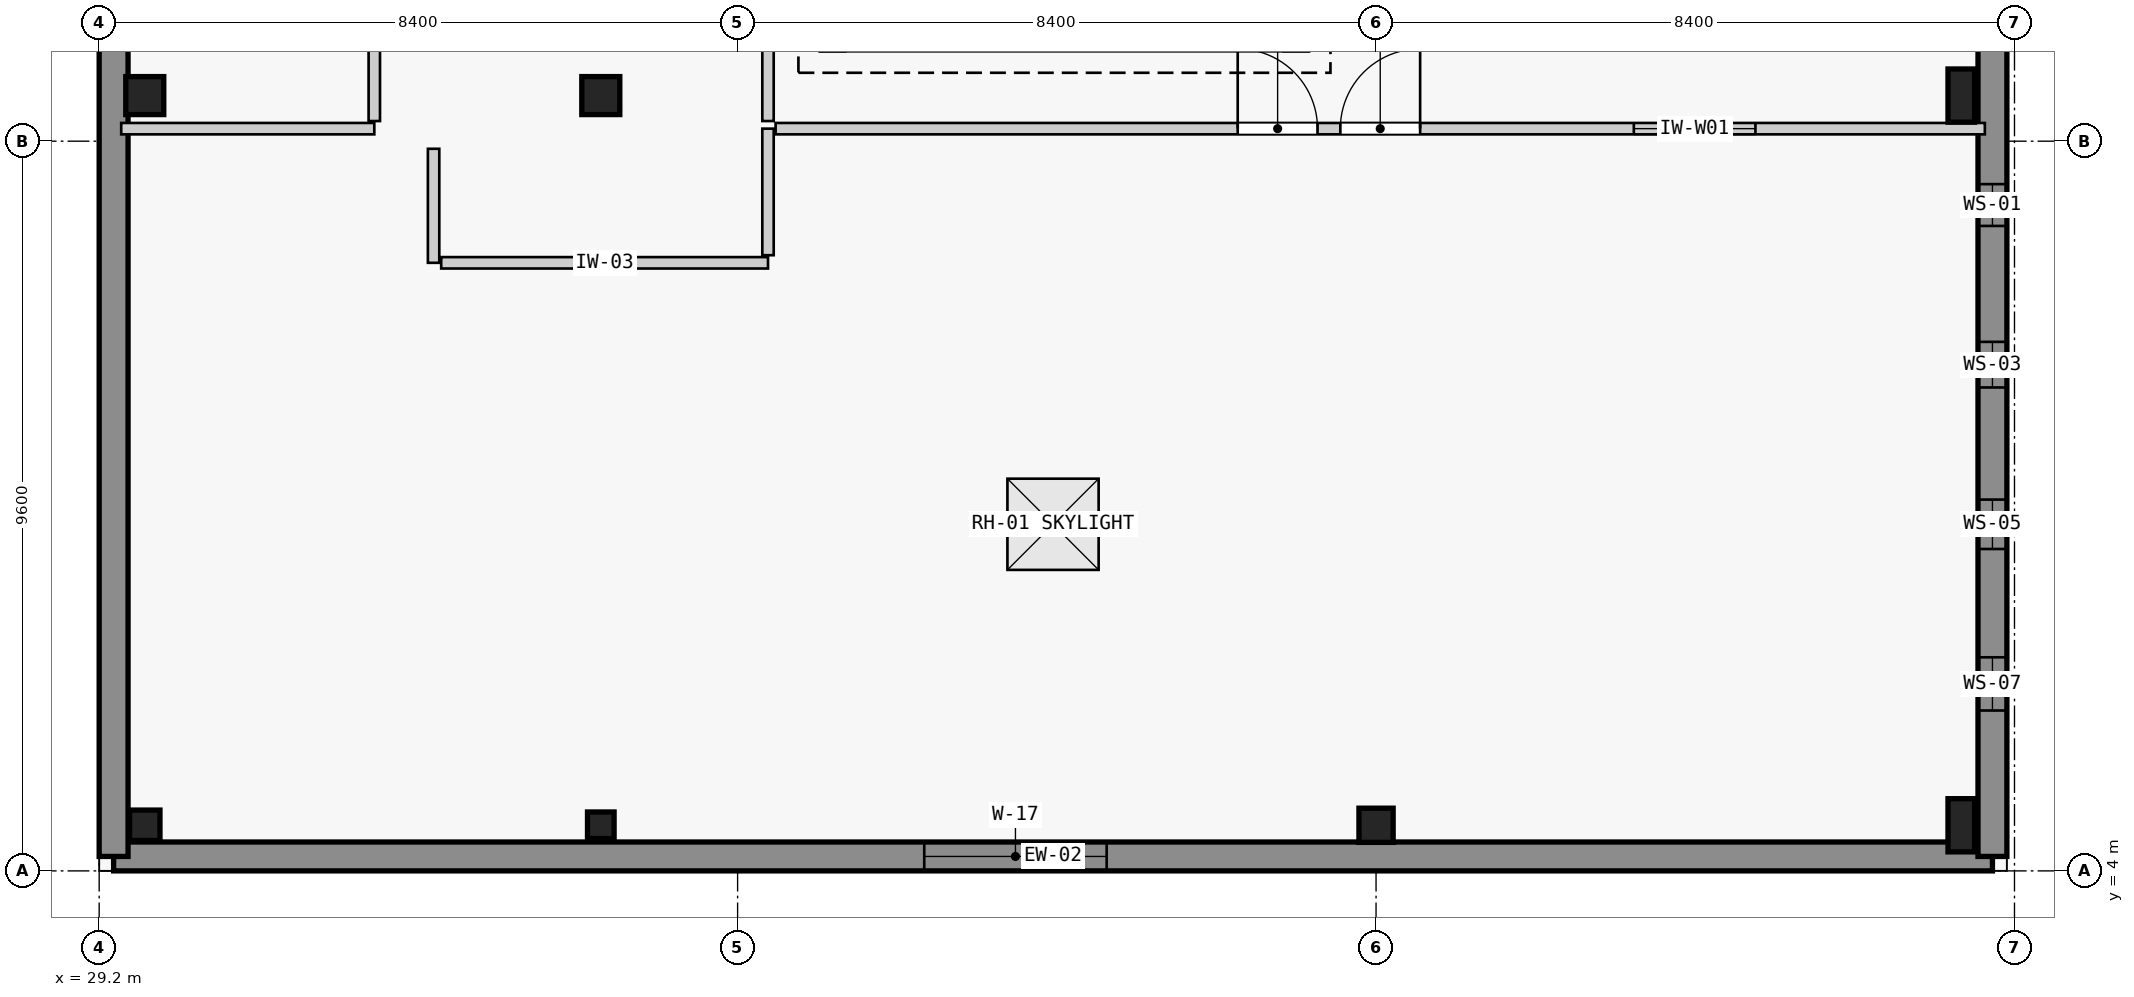
"""IFC4 building model, lengths in metres.
Left out: names, types, materials, properties, quantities, classifications, styles, units other than length and angle.
Written with IfcOpenShell. Run it as: python <this file> out.ifc"""

import sys

from ifc_helpers import new_model, si_unit, direction, frame, frame_2d, origin, origin_2d, place, context, subcontext, project, spatial, rectangle, extrude, element, fill, save


model = new_model("IFC4")
c1 = context("Model", 3, precision=1e-05, world=origin(), true_north=direction((0.0, 1.0)))
c2 = subcontext(c1, "Body", "Model", "MODEL_VIEW")
j1 = project(units=[si_unit("LENGTHUNIT", "METRE"), si_unit("PLANEANGLEUNIT", "RADIAN")], contexts=[c1])
p1 = place(None, origin())
s1 = spatial("IfcSite", under=j1, at=p1, CompositionType="ELEMENT")
p2 = place(p1, origin())
s2 = spatial("IfcBuilding", under=s1, at=p2, CompositionType="ELEMENT")
p3 = place(p2, frame((0.0, 0.0, 5.4)))
s3 = spatial("IfcBuildingStorey", under=s2, at=p3, CompositionType="ELEMENT", Elevation=5.4)
p4 = place(p3, frame((29.8, 4.6, 0.0), z_axis=(0.0, 0.0, 1.0), x_axis=(1.0, 0.0, 0.0)))
e1 = element("IfcColumn", 1, at=p4, inside=s3, PredefinedType="COLUMN", context=c2, shape_type="SweptSolid", body=[
    extrude(rectangle(XDim=0.4, YDim=0.4, at=origin_2d()), origin(), (0.0, 0.0, 1.0), 4.2),
])
p5 = place(p3, frame((29.8, 14.2, 0.0), z_axis=(0.0, 0.0, 1.0), x_axis=(1.0, 0.0, 0.0)))
e2 = element("IfcColumn", 2, at=p5, inside=s3, PredefinedType="COLUMN", context=c2, shape_type="SweptSolid", body=[
    extrude(rectangle(XDim=0.5, YDim=0.5, at=origin_2d()), origin(), (0.0, 0.0, 1.0), 4.2),
])
p6 = place(p3, frame((35.8, 4.6, 0.0), z_axis=(0.0, 0.0, 1.0), x_axis=(1.0, 0.0, 0.0)))
e3 = element("IfcColumn", 3, at=p6, inside=s3, PredefinedType="COLUMN", context=c2, shape_type="SweptSolid", body=[
    extrude(rectangle(XDim=0.35, YDim=0.35, at=origin_2d()), origin(), (0.0, 0.0, 1.0), 4.2),
])
p7 = place(p3, frame((35.8, 14.2, 0.0), z_axis=(0.0, 0.0, 1.0), x_axis=(1.0, 0.0, 0.0)))
e4 = element("IfcColumn", 4, at=p7, inside=s3, PredefinedType="COLUMN", context=c2, shape_type="SweptSolid", body=[
    extrude(rectangle(XDim=0.5, YDim=0.5, at=origin_2d()), origin(), (0.0, 0.0, 1.0), 4.2),
])
p8 = place(p3, frame((46.0, 4.6, 0.0), z_axis=(0.0, 0.0, 1.0), x_axis=(1.0, 0.0, 0.0)))
e5 = element("IfcColumn", 5, at=p8, inside=s3, PredefinedType="COLUMN", context=c2, shape_type="SweptSolid", body=[
    extrude(rectangle(XDim=0.45, YDim=0.45, at=origin_2d()), origin(), (0.0, 0.0, 1.0), 4.2),
])
for number, where, z_axis, x_axis in (
    (6, (53.7, 4.6, 0.0), (0.0, 0.0, 1.0), (1.0, 0.0, 0.0)),
    (7, (53.7, 14.2, 0.0), (0.0, 0.0, 1.0), (1.0, 0.0, 0.0)),
):
    element("IfcColumn", number, at=place(p3, frame(where, z_axis=z_axis, x_axis=x_axis)), inside=s3, PredefinedType="COLUMN", context=c2, shape_type="SweptSolid", body=[
        extrude(rectangle(XDim=0.35, YDim=0.7, at=origin_2d()), origin(), (0.0, 0.0, 1.0), 4.2),
    ])
p9 = place(p3, frame((54.11, 4.19, 0.0), z_axis=(0.0, 0.0, 1.0), x_axis=(-1.0, 0.0, 0.0)))
e8 = element("IfcWall", 8, at=p9, inside=s3, PredefinedType="STANDARD", context=c2, shape_type="SweptSolid", body=[
    extrude(rectangle(XDim=24.72, YDim=0.38, at=frame_2d((12.36, 0.0))), origin(), (0.0, 0.0, 1.0), 3.94),
])
p10 = place(p9, frame((11.654, 0.0, 1.65)))
e9 = element("IfcOpeningElement", 9, at=p10, cuts=e8, PredefinedType="OPENING", context=c2, shape_type="SweptSolid", body=[
    extrude(rectangle(XDim=2.4, YDim=1.8, at=frame_2d((1.2, 0.9))), frame((0.0, 0.2, 0.0), z_axis=(0.0, -1.0, 0.0), x_axis=(1.0, 0.0, 0.0)), (0.0, 0.0, 1.0), 0.4),
])
p11 = place(p3, frame((29.39, 4.19, 0.0), z_axis=(0.0, 0.0, 1.0), x_axis=(0.0, 1.0, 0.0)))
e10 = element("IfcWall", 10, at=p11, inside=s3, PredefinedType="STANDARD", context=c2, shape_type="SweptSolid", body=[
    extrude(rectangle(XDim=37.92, YDim=0.38, at=frame_2d((18.96, 0.0))), origin(), (0.0, 0.0, 1.0), 3.94),
])
p12 = place(p11, frame((16.568, 0.0, 0.96)))
e11 = element("IfcOpeningElement", 11, at=p12, cuts=e10, PredefinedType="OPENING", context=c2, shape_type="SweptSolid", body=[
    extrude(rectangle(XDim=1.5, YDim=2.6, at=frame_2d((0.75, 1.3))), frame((0.0, 0.2, 0.0), z_axis=(0.0, -1.0, 0.0), x_axis=(1.0, 0.0, 0.0)), (0.0, 0.0, 1.0), 0.4),
])
p13 = place(p3, frame((54.11, 42.11, 0.0), z_axis=(0.0, 0.0, 1.0), x_axis=(0.0, -1.0, 0.0)))
e12 = element("IfcWall", 12, at=p13, inside=s3, PredefinedType="STANDARD", context=c2, shape_type="SweptSolid", body=[
    extrude(rectangle(XDim=37.92, YDim=0.38, at=frame_2d((18.96, 0.0))), origin(), (0.0, 0.0, 1.0), 3.94),
])
p14 = place(p13, frame((1.45, 0.0, 0.95)))
e13 = element("IfcOpeningElement", 13, at=p14, cuts=e12, PredefinedType="OPENING", context=c2, shape_type="SweptSolid", body=[
    extrude(rectangle(XDim=1.2, YDim=2.4, at=frame_2d((0.6, 1.2))), frame((0.0, 0.2, 0.0), z_axis=(0.0, -1.0, 0.0), x_axis=(1.0, 0.0, 0.0)), (0.0, 0.0, 1.0), 0.4),
])
p15 = place(p13, frame((3.475, 0.0, 0.95)))
e14 = element("IfcOpeningElement", 14, at=p15, cuts=e12, PredefinedType="OPENING", context=c2, shape_type="SweptSolid", body=[
    extrude(rectangle(XDim=1.35, YDim=2.5, at=frame_2d((0.675, 1.25))), frame((0.0, 0.2, 0.0), z_axis=(0.0, -1.0, 0.0), x_axis=(1.0, 0.0, 0.0)), (0.0, 0.0, 1.0), 0.4),
])
p16 = place(p13, frame((5.5, 0.0, 0.95)))
e15 = element("IfcOpeningElement", 15, at=p16, cuts=e12, PredefinedType="OPENING", context=c2, shape_type="SweptSolid", body=[
    extrude(rectangle(XDim=1.5, YDim=2.2, at=frame_2d((0.75, 1.1))), frame((0.0, 0.2, 0.0), z_axis=(0.0, -1.0, 0.0), x_axis=(1.0, 0.0, 0.0)), (0.0, 0.0, 1.0), 0.4),
])
p17 = place(p13, frame((8.075, 0.0, 0.95)))
e16 = element("IfcOpeningElement", 16, at=p17, cuts=e12, PredefinedType="OPENING", context=c2, shape_type="SweptSolid", body=[
    extrude(rectangle(XDim=0.55, YDim=2.1, at=frame_2d((0.275, 1.05))), frame((0.0, 0.2, 0.0), z_axis=(0.0, -1.0, 0.0), x_axis=(1.0, 0.0, 0.0)), (0.0, 0.0, 1.0), 0.4),
])
p18 = place(p13, frame((10.15, 0.0, 0.95)))
e17 = element("IfcOpeningElement", 17, at=p18, cuts=e12, PredefinedType="OPENING", context=c2, shape_type="SweptSolid", body=[
    extrude(rectangle(XDim=0.6, YDim=2.2, at=frame_2d((0.3, 1.1))), frame((0.0, 0.2, 0.0), z_axis=(0.0, -1.0, 0.0), x_axis=(1.0, 0.0, 0.0)), (0.0, 0.0, 1.0), 0.4),
])
p19 = place(p13, frame((12.225, 0.0, 0.95)))
e18 = element("IfcOpeningElement", 18, at=p19, cuts=e12, PredefinedType="OPENING", context=c2, shape_type="SweptSolid", body=[
    extrude(rectangle(XDim=0.65, YDim=2.4, at=frame_2d((0.325, 1.2))), frame((0.0, 0.2, 0.0), z_axis=(0.0, -1.0, 0.0), x_axis=(1.0, 0.0, 0.0)), (0.0, 0.0, 1.0), 0.4),
])
p20 = place(p13, frame((14.275, 0.0, 0.95)))
e19 = element("IfcOpeningElement", 19, at=p20, cuts=e12, PredefinedType="OPENING", context=c2, shape_type="SweptSolid", body=[
    extrude(rectangle(XDim=0.75, YDim=2.3, at=frame_2d((0.375, 1.15))), frame((0.0, 0.2, 0.0), z_axis=(0.0, -1.0, 0.0), x_axis=(1.0, 0.0, 0.0)), (0.0, 0.0, 1.0), 0.4),
])
p21 = place(p13, frame((16.3, 0.0, 0.95)))
e20 = element("IfcOpeningElement", 20, at=p21, cuts=e12, PredefinedType="OPENING", context=c2, shape_type="SweptSolid", body=[
    extrude(rectangle(XDim=0.9, YDim=2.2, at=frame_2d((0.45, 1.1))), frame((0.0, 0.2, 0.0), z_axis=(0.0, -1.0, 0.0), x_axis=(1.0, 0.0, 0.0)), (0.0, 0.0, 1.0), 0.4),
])
p22 = place(p13, frame((20.35, 0.0, 0.95)))
e21 = element("IfcOpeningElement", 21, at=p22, cuts=e12, PredefinedType="OPENING", context=c2, shape_type="SweptSolid", body=[
    extrude(rectangle(XDim=1.2, YDim=1.8, at=frame_2d((0.6, 0.9))), frame((0.0, 0.2, 0.0), z_axis=(0.0, -1.0, 0.0), x_axis=(1.0, 0.0, 0.0)), (0.0, 0.0, 1.0), 0.4),
])
p23 = place(p13, frame((22.45, 0.0, 0.95)))
e22 = element("IfcOpeningElement", 22, at=p23, cuts=e12, PredefinedType="OPENING", context=c2, shape_type="SweptSolid", body=[
    extrude(rectangle(XDim=1.2, YDim=2.4, at=frame_2d((0.6, 1.2))), frame((0.0, 0.2, 0.0), z_axis=(0.0, -1.0, 0.0), x_axis=(1.0, 0.0, 0.0)), (0.0, 0.0, 1.0), 0.4),
])
p24 = place(p13, frame((24.475, 0.0, 0.95)))
e23 = element("IfcOpeningElement", 23, at=p24, cuts=e12, PredefinedType="OPENING", context=c2, shape_type="SweptSolid", body=[
    extrude(rectangle(XDim=1.35, YDim=2.5, at=frame_2d((0.675, 1.25))), frame((0.0, 0.2, 0.0), z_axis=(0.0, -1.0, 0.0), x_axis=(1.0, 0.0, 0.0)), (0.0, 0.0, 1.0), 0.4),
])
p25 = place(p13, frame((29.075, 0.0, 0.95)))
e24 = element("IfcOpeningElement", 24, at=p25, cuts=e12, PredefinedType="OPENING", context=c2, shape_type="SweptSolid", body=[
    extrude(rectangle(XDim=0.55, YDim=1.8, at=frame_2d((0.275, 0.9))), frame((0.0, 0.2, 0.0), z_axis=(0.0, -1.0, 0.0), x_axis=(1.0, 0.0, 0.0)), (0.0, 0.0, 1.0), 0.4),
])
p26 = place(p13, frame((31.15, 0.0, 0.95)))
e25 = element("IfcOpeningElement", 25, at=p26, cuts=e12, PredefinedType="OPENING", context=c2, shape_type="SweptSolid", body=[
    extrude(rectangle(XDim=0.6, YDim=1.9, at=frame_2d((0.3, 0.95))), frame((0.0, 0.2, 0.0), z_axis=(0.0, -1.0, 0.0), x_axis=(1.0, 0.0, 0.0)), (0.0, 0.0, 1.0), 0.4),
])
p27 = place(p13, frame((33.225, 0.0, 0.95)))
e26 = element("IfcOpeningElement", 26, at=p27, cuts=e12, PredefinedType="OPENING", context=c2, shape_type="SweptSolid", body=[
    extrude(rectangle(XDim=0.65, YDim=2.0, at=frame_2d((0.325, 1.0))), frame((0.0, 0.2, 0.0), z_axis=(0.0, -1.0, 0.0), x_axis=(1.0, 0.0, 0.0)), (0.0, 0.0, 1.0), 0.4),
])
p28 = place(p13, frame((35.3, 0.0, 0.95)))
e27 = element("IfcOpeningElement", 27, at=p28, cuts=e12, PredefinedType="OPENING", context=c2, shape_type="SweptSolid", body=[
    extrude(rectangle(XDim=0.7, YDim=2.1, at=frame_2d((0.35, 1.05))), frame((0.0, 0.2, 0.0), z_axis=(0.0, -1.0, 0.0), x_axis=(1.0, 0.0, 0.0)), (0.0, 0.0, 1.0), 0.4),
])
p29 = place(p3, frame((33.6, 13.5, 0.0), z_axis=(0.0, 0.0, 1.0), x_axis=(0.0, -1.0, 0.0)))
e28 = element("IfcWall", 28, at=p29, inside=s3, PredefinedType="PARTITIONING", context=c2, shape_type="SweptSolid", body=[
    extrude(rectangle(XDim=1.5, YDim=0.15, at=frame_2d((0.75, 0.0))), origin(), (0.0, 0.0, 1.0), 3.94),
])
p30 = place(p3, frame((33.7, 12.0, 0.0), z_axis=(0.0, 0.0, 1.0), x_axis=(1.0, 0.0, 0.0)))
e29 = element("IfcWall", 29, at=p30, inside=s3, PredefinedType="PARTITIONING", context=c2, shape_type="SweptSolid", body=[
    extrude(rectangle(XDim=4.3, YDim=0.15, at=frame_2d((2.15, 0.0))), origin(), (0.0, 0.0, 1.0), 3.22),
])
p31 = place(p3, frame((38.0, 12.1, 0.0), z_axis=(0.0, 0.0, 1.0), x_axis=(0.0, 1.0, 0.0)))
e30 = element("IfcWall", 30, at=p31, inside=s3, PredefinedType="PARTITIONING", context=c2, shape_type="SweptSolid", body=[
    extrude(rectangle(XDim=1.665, YDim=0.15, at=frame_2d((0.833, 0.0))), origin(), (0.0, 0.0, 1.0), 3.94),
])
p32 = place(p3, frame((38.1, 13.765, 0.0), z_axis=(0.0, 0.0, 1.0), x_axis=(1.0, 0.0, 0.0)))
e31 = element("IfcWall", 31, at=p32, inside=s3, PredefinedType="PARTITIONING", context=c2, shape_type="SweptSolid", body=[
    extrude(rectangle(XDim=15.91, YDim=0.15, at=frame_2d((7.955, 0.0))), origin(), (0.0, 0.0, 1.0), 3.22),
])
p33 = place(p32, frame((7.43, 0.0, 0.0)))
e32 = element("IfcOpeningElement", 32, at=p33, cuts=e31, PredefinedType="OPENING", context=c2, shape_type="SweptSolid", body=[
    extrude(rectangle(XDim=1.05, YDim=2.2, at=frame_2d((0.525, 1.1))), frame((0.0, 0.085, 0.0), z_axis=(0.0, -1.0, 0.0), x_axis=(1.0, 0.0, 0.0)), (0.0, 0.0, 1.0), 0.17),
])
p34 = place(p32, frame((11.292, 0.0, 1.05)))
e33 = element("IfcOpeningElement", 33, at=p34, cuts=e31, PredefinedType="OPENING", context=c2, shape_type="SweptSolid", body=[
    extrude(rectangle(XDim=1.6, YDim=1.5, at=frame_2d((0.8, 0.75))), frame((0.0, 0.085, 0.0), z_axis=(0.0, -1.0, 0.0), x_axis=(1.0, 0.0, 0.0)), (0.0, 0.0, 1.0), 0.17),
])
p35 = place(p32, frame((6.08, 0.0, 0.0)))
e34 = element("IfcOpeningElement", 34, at=p35, cuts=e31, PredefinedType="OPENING", context=c2, shape_type="SweptSolid", body=[
    extrude(rectangle(XDim=1.05, YDim=2.2, at=frame_2d((0.525, 1.1))), frame((0.0, 0.085, 0.0), z_axis=(0.0, -1.0, 0.0), x_axis=(1.0, 0.0, 0.0)), (0.0, 0.0, 1.0), 0.17),
])
p36 = place(p3, frame((29.49, 13.765, 0.0), z_axis=(0.0, 0.0, 1.0), x_axis=(1.0, 0.0, 0.0)))
e35 = element("IfcWall", 35, at=p36, inside=s3, PredefinedType="PARTITIONING", context=c2, shape_type="SweptSolid", body=[
    extrude(rectangle(XDim=3.33, YDim=0.15, at=frame_2d((1.665, 0.0))), origin(), (0.0, 0.0, 1.0), 3.22),
])
p37 = place(p3, frame((38.0, 13.865, 0.0), z_axis=(0.0, 0.0, 1.0), x_axis=(0.0, 1.0, 0.0)))
e36 = element("IfcWall", 36, at=p37, inside=s3, PredefinedType="PARTITIONING", context=c2, shape_type="SweptSolid", body=[
    extrude(rectangle(XDim=2.435, YDim=0.15, at=frame_2d((1.218, 0.0))), origin(), (0.0, 0.0, 1.0), 3.22),
])
p38 = place(p3, frame((32.82, 23.05, 0.0), z_axis=(0.0, 0.0, 1.0), x_axis=(0.0, -1.0, 0.0)))
e37 = element("IfcWall", 37, at=p38, inside=s3, PredefinedType="PARTITIONING", context=c2, shape_type="SweptSolid", body=[
    extrude(rectangle(XDim=9.185, YDim=0.15, at=frame_2d((4.593, 0.0))), origin(), (0.0, 0.0, 1.0), 3.32),
])
p39 = place(p38, frame((4.067, 0.0, 0.0)))
e38 = element("IfcOpeningElement", 38, at=p39, cuts=e37, PredefinedType="OPENING", context=c2, shape_type="SweptSolid", body=[
    extrude(rectangle(XDim=1.05, YDim=2.2, at=frame_2d((0.525, 1.1))), frame((0.0, 0.085, 0.0), z_axis=(0.0, -1.0, 0.0), x_axis=(1.0, 0.0, 0.0)), (0.0, 0.0, 1.0), 0.17),
])
p40 = place(p38, frame((6.181, 0.0, 1.05)))
e39 = element("IfcOpeningElement", 39, at=p40, cuts=e37, PredefinedType="OPENING", context=c2, shape_type="SweptSolid", body=[
    extrude(rectangle(XDim=1.6, YDim=1.5, at=frame_2d((0.8, 0.75))), frame((0.0, 0.085, 0.0), z_axis=(0.0, -1.0, 0.0), x_axis=(1.0, 0.0, 0.0)), (0.0, 0.0, 1.0), 0.17),
])
p41 = place(p10, origin())
e40 = element("IfcWindow", 40, at=p41, inside=s3, PartitioningType="SINGLE_PANEL", PredefinedType="WINDOW", context=c2, shape_type="SweptSolid", body=[
    extrude(rectangle(XDim=2.4, YDim=1.8, at=frame_2d((1.2, 0.9))), frame((0.0, 0.03, 0.0), z_axis=(0.0, -1.0, 0.0), x_axis=(1.0, 0.0, 0.0)), (0.0, 0.0, 1.0), 0.06),
])
fill(e9, e40)
p42 = place(p25, origin())
e41 = element("IfcWindow", 41, at=p42, inside=s3, PartitioningType="SINGLE_PANEL", PredefinedType="WINDOW", context=c2, shape_type="SweptSolid", body=[
    extrude(rectangle(XDim=0.55, YDim=1.8, at=frame_2d((0.275, 0.9))), frame((0.0, 0.03, 0.0), z_axis=(0.0, -1.0, 0.0), x_axis=(1.0, 0.0, 0.0)), (0.0, 0.0, 1.0), 0.06),
])
fill(e24, e41)
p43 = place(p26, origin())
e42 = element("IfcWindow", 42, at=p43, inside=s3, PartitioningType="SINGLE_PANEL", PredefinedType="WINDOW", context=c2, shape_type="SweptSolid", body=[
    extrude(rectangle(XDim=0.6, YDim=1.9, at=frame_2d((0.3, 0.95))), frame((0.0, 0.03, 0.0), z_axis=(0.0, -1.0, 0.0), x_axis=(1.0, 0.0, 0.0)), (0.0, 0.0, 1.0), 0.06),
])
fill(e25, e42)
p44 = place(p27, origin())
e43 = element("IfcWindow", 43, at=p44, inside=s3, PartitioningType="SINGLE_PANEL", PredefinedType="WINDOW", context=c2, shape_type="SweptSolid", body=[
    extrude(rectangle(XDim=0.65, YDim=2.0, at=frame_2d((0.325, 1.0))), frame((0.0, 0.03, 0.0), z_axis=(0.0, -1.0, 0.0), x_axis=(1.0, 0.0, 0.0)), (0.0, 0.0, 1.0), 0.06),
])
fill(e26, e43)
p45 = place(p28, origin())
e44 = element("IfcWindow", 44, at=p45, inside=s3, PartitioningType="SINGLE_PANEL", PredefinedType="WINDOW", context=c2, shape_type="SweptSolid", body=[
    extrude(rectangle(XDim=0.7, YDim=2.1, at=frame_2d((0.35, 1.05))), frame((0.0, 0.03, 0.0), z_axis=(0.0, -1.0, 0.0), x_axis=(1.0, 0.0, 0.0)), (0.0, 0.0, 1.0), 0.06),
])
fill(e27, e44)
p46 = place(p2, frame((0.0, 0.0, 26.7)))
p47 = place(p46, frame((0.0, 0.0, -17.36)))
p48 = place(p47, frame((41.75, 8.56, 0.0)))
p49 = place(p48, frame((0.0, 0.0, 0.21)))
e45 = element("IfcWindow", 45, at=p49, inside=s3, PartitioningType="SINGLE_PANEL", PredefinedType="SKYLIGHT", context=c2, shape_type="SweptSolid", body=[
    extrude(rectangle(XDim=1.2, YDim=1.2, at=origin_2d()), origin(), (0.0, 0.0, 1.0), 0.05),
])
p50 = place(p33, origin())
e46 = element("IfcDoor", 46, at=p50, inside=s3, OperationType="SINGLE_SWING_RIGHT", PredefinedType="DOOR", context=c2, shape_type="SweptSolid", body=[
    extrude(rectangle(XDim=1.05, YDim=2.2, at=frame_2d((0.525, 1.1))), frame((0.0, 0.025, 0.0), z_axis=(0.0, -1.0, 0.0), x_axis=(1.0, 0.0, 0.0)), (0.0, 0.0, 1.0), 0.05),
])
fill(e32, e46)
p51 = place(p34, origin())
e47 = element("IfcWindow", 47, at=p51, inside=s3, PartitioningType="SINGLE_PANEL", PredefinedType="WINDOW", context=c2, shape_type="SweptSolid", body=[
    extrude(rectangle(XDim=1.6, YDim=1.5, at=frame_2d((0.8, 0.75))), frame((0.0, 0.03, 0.0), z_axis=(0.0, -1.0, 0.0), x_axis=(1.0, 0.0, 0.0)), (0.0, 0.0, 1.0), 0.06),
])
fill(e33, e47)
p52 = place(p35, origin())
e48 = element("IfcDoor", 48, at=p52, inside=s3, OperationType="SINGLE_SWING_LEFT", PredefinedType="DOOR", context=c2, shape_type="SweptSolid", body=[
    extrude(rectangle(XDim=1.05, YDim=2.2, at=frame_2d((0.525, 1.1))), frame((0.0, 0.025, 0.0), z_axis=(0.0, -1.0, 0.0), x_axis=(1.0, 0.0, 0.0)), (0.0, 0.0, 1.0), 0.05),
])
fill(e34, e48)
save(model, sys.argv[1])
